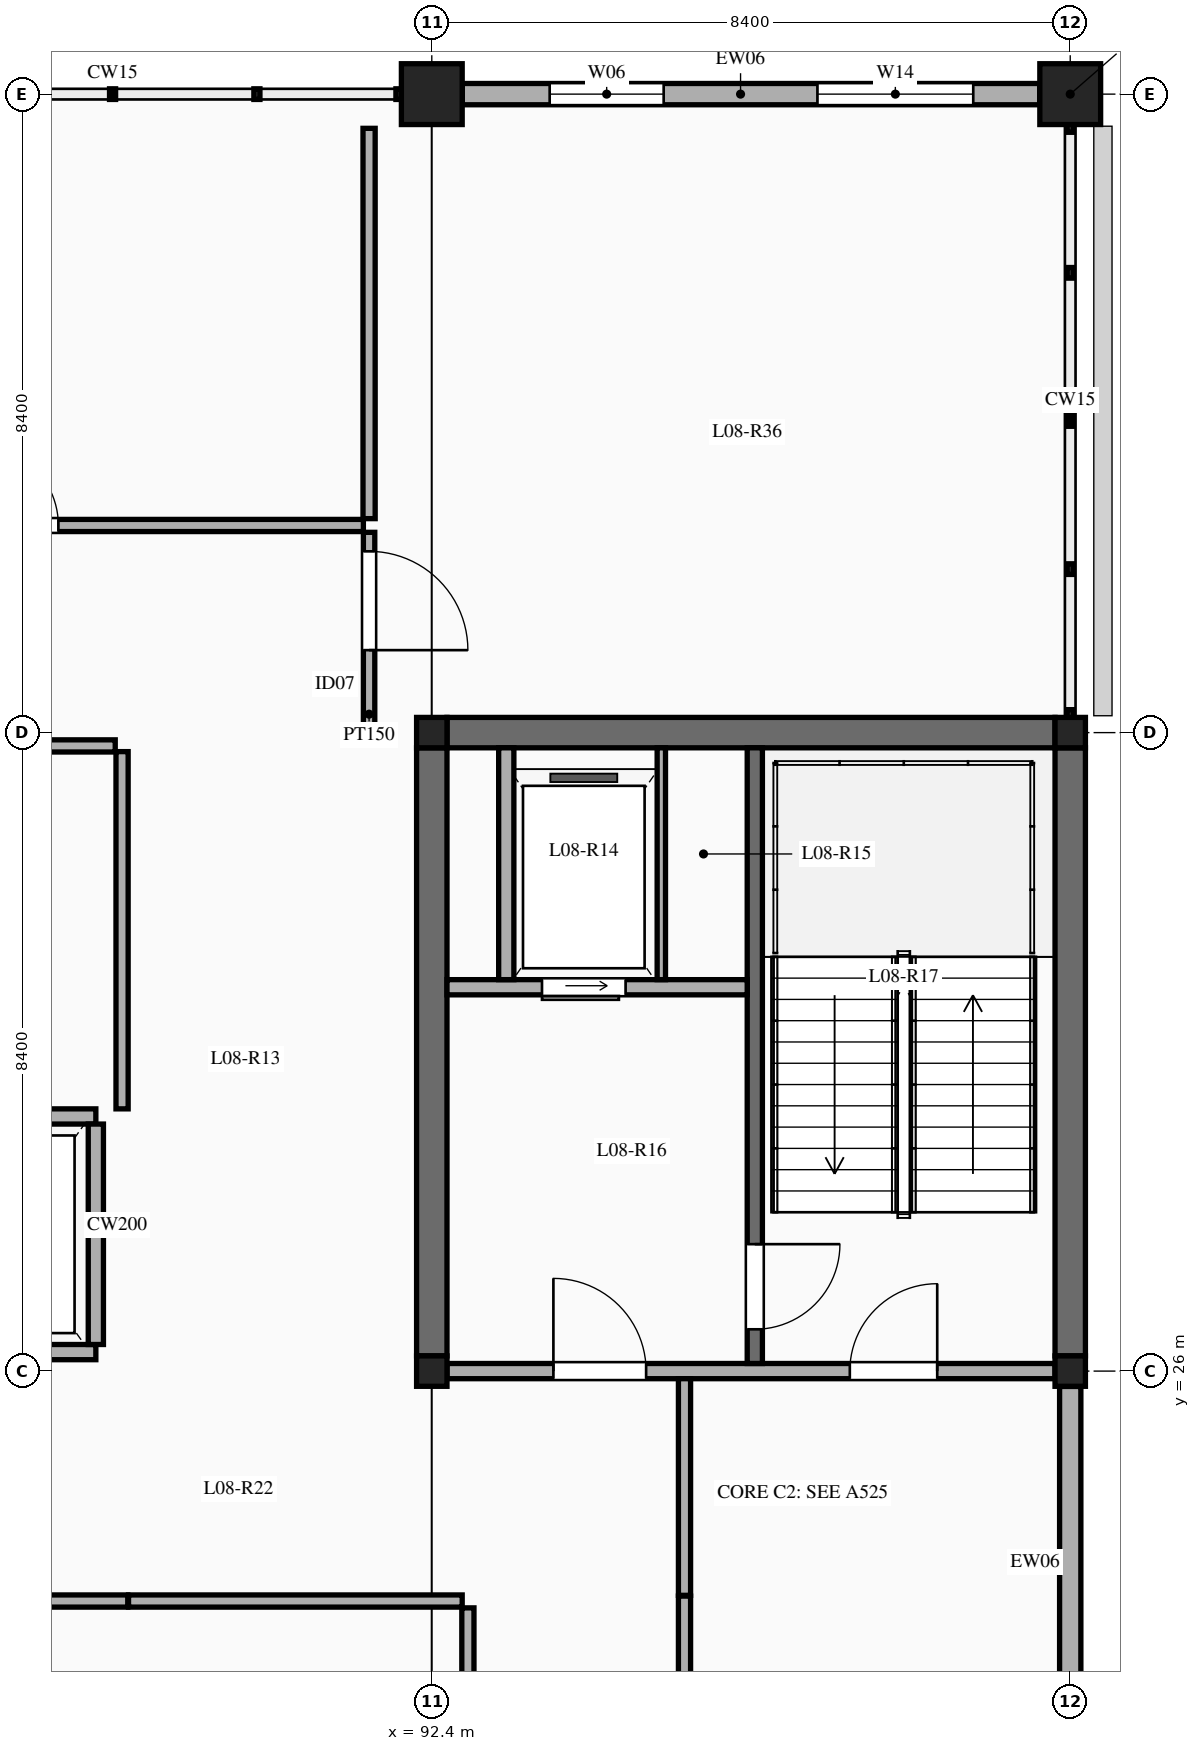
"""IFC4 building model, lengths in metres.
Left out: names, types, materials, properties, quantities, classifications, styles, units other than length and angle.
Written with IfcOpenShell. Run it as: python <this file> out.ifc"""

import sys

from ifc_helpers import new_model, si_unit, direction, frame, frame_2d, origin, origin_2d, place, context, subcontext, project, spatial, rectangle, extrude, element, fill, save


model = new_model("IFC4")
c1 = context("Model", 3, precision=1e-05, world=origin(), true_north=direction((0.0, 1.0)))
c2 = subcontext(c1, "Body", "Model", "MODEL_VIEW")
j1 = project(units=[si_unit("LENGTHUNIT", "METRE"), si_unit("PLANEANGLEUNIT", "RADIAN")], contexts=[c1])
p1 = place(None, origin())
s1 = spatial("IfcSite", under=j1, at=p1, CompositionType="ELEMENT")
p2 = place(p1, origin())
s2 = spatial("IfcBuilding", under=s1, at=p2, CompositionType="ELEMENT")
p3 = place(p2, frame((0.0, 0.0, 37.5)))
s3 = spatial("IfcBuildingStorey", under=s2, at=p3, CompositionType="ELEMENT", Elevation=37.5)
for number, where, z_axis, x_axis in (
    (1, (92.4, 26.0, 0.0), (0.0, 0.0, 1.0), (1.0, 0.0, 0.0)),
    (2, (92.4, 34.4, 0.0), (0.0, 0.0, 1.0), (1.0, 0.0, 0.0)),
):
    element("IfcColumn", number, at=place(p3, frame(where, z_axis=z_axis, x_axis=x_axis)), inside=s3, PredefinedType="COLUMN", context=c2, shape_type="SweptSolid", body=[
        extrude(rectangle(XDim=0.4, YDim=0.4, at=origin_2d()), origin(), (0.0, 0.0, 1.0), 4.5),
    ])
p4 = place(p3, frame((92.4, 42.8, 0.0), z_axis=(0.0, 0.0, 1.0), x_axis=(1.0, 0.0, 0.0)))
e3 = element("IfcColumn", 3, at=p4, inside=s3, PredefinedType="COLUMN", context=c2, shape_type="SweptSolid", body=[
    extrude(rectangle(XDim=0.8, YDim=0.8, at=origin_2d()), origin(), (0.0, 0.0, 1.0), 4.5),
])
for number, where, z_axis, x_axis in (
    (4, (100.8, 26.0, 0.0), (0.0, 0.0, 1.0), (1.0, 0.0, 0.0)),
    (5, (100.8, 34.4, 0.0), (0.0, 0.0, 1.0), (1.0, 0.0, 0.0)),
):
    element("IfcColumn", number, at=place(p3, frame(where, z_axis=z_axis, x_axis=x_axis)), inside=s3, PredefinedType="COLUMN", context=c2, shape_type="SweptSolid", body=[
        extrude(rectangle(XDim=0.4, YDim=0.4, at=origin_2d()), origin(), (0.0, 0.0, 1.0), 4.5),
    ])
p5 = place(p3, frame((100.8, 42.8, 0.0), z_axis=(0.0, 0.0, 1.0), x_axis=(1.0, 0.0, 0.0)))
e6 = element("IfcColumn", 6, at=p5, inside=s3, PredefinedType="COLUMN", context=c2, shape_type="SweptSolid", body=[
    extrude(rectangle(XDim=0.8, YDim=0.8, at=origin_2d()), origin(), (0.0, 0.0, 1.0), 4.5),
])
for number, where, z_axis, x_axis in (
    (7, (92.4, 26.2, 0.0), (0.0, 0.0, 1.0), (0.0, 1.0, 0.0)),
    (8, (100.8, 26.2, 0.0), (0.0, 0.0, 1.0), (0.0, 1.0, 0.0)),
    (9, (92.6, 34.4, 0.0), (0.0, 0.0, 1.0), (1.0, 0.0, 0.0)),
):
    element("IfcWall", number, at=place(p3, frame(where, z_axis=z_axis, x_axis=x_axis)), inside=s3, PredefinedType="SHEAR", context=c2, shape_type="SweptSolid", body=[
        extrude(rectangle(XDim=8.0, YDim=0.4, at=frame_2d((4.0, 0.0))), origin(), (0.0, 0.0, 1.0), 4.5),
    ])
p6 = place(p3, frame((92.802, 42.8, 0.0), z_axis=(0.0, 0.0, 1.0), x_axis=(1.0, 0.0, 0.0)))
e10 = element("IfcWall", 10, at=p6, inside=s3, PredefinedType="ELEMENTEDWALL", context=c2, shape_type="SweptSolid", body=[
    extrude(rectangle(XDim=7.596, YDim=0.28, at=frame_2d((3.798, 0.0))), origin(), (0.0, 0.0, 1.0), 3.55),
])
p7 = place(p6, frame((1.149, 0.0, 0.9)))
e11 = element("IfcOpeningElement", 11, at=p7, cuts=e10, PredefinedType="OPENING", context=c2, shape_type="SweptSolid", body=[
    extrude(rectangle(XDim=1.5, YDim=2.0, at=frame_2d((0.75, 1.0))), frame((0.0, 0.15, 0.0), z_axis=(0.0, -1.0, 0.0), x_axis=(1.0, 0.0, 0.0)), (0.0, 0.0, 1.0), 0.3),
])
p8 = place(p6, frame((4.672, 0.0, 0.9)))
e12 = element("IfcOpeningElement", 12, at=p8, cuts=e10, PredefinedType="OPENING", context=c2, shape_type="SweptSolid", body=[
    extrude(rectangle(XDim=2.05, YDim=2.1, at=frame_2d((1.025, 1.05))), frame((0.0, 0.15, 0.0), z_axis=(0.0, -1.0, 0.0), x_axis=(1.0, 0.0, 0.0)), (0.0, 0.0, 1.0), 0.3),
])
p9 = place(p3, frame((100.8, 18.002, 0.0), z_axis=(0.0, 0.0, 1.0), x_axis=(0.0, 1.0, 0.0)))
e13 = element("IfcWall", 13, at=p9, inside=s3, PredefinedType="ELEMENTEDWALL", context=c2, shape_type="SweptSolid", body=[
    extrude(rectangle(XDim=7.796, YDim=0.28, at=frame_2d((3.898, 0.0))), origin(), (0.0, 0.0, 1.0), 3.55),
])
p10 = place(p9, frame((1.024, 0.0, 0.9)))
e14 = element("IfcOpeningElement", 14, at=p10, cuts=e13, PredefinedType="OPENING", context=c2, shape_type="SweptSolid", body=[
    extrude(rectangle(XDim=1.85, YDim=2.05, at=frame_2d((0.925, 1.025))), frame((0.0, 0.15, 0.0), z_axis=(0.0, -1.0, 0.0), x_axis=(1.0, 0.0, 0.0)), (0.0, 0.0, 1.0), 0.3),
])
p11 = place(p3, frame((92.6, 26.0, 0.0), z_axis=(0.0, 0.0, 1.0), x_axis=(1.0, 0.0, 0.0)))
e15 = element("IfcWall", 15, at=p11, inside=s3, PredefinedType="SOLIDWALL", context=c2, shape_type="SweptSolid", body=[
    extrude(rectangle(XDim=8.0, YDim=0.2, at=frame_2d((4.0, 0.0))), origin(), (0.0, 0.0, 1.0), 3.78),
])
p12 = place(p11, frame((1.4, 0.0, 0.0)))
e16 = element("IfcOpeningElement", 16, at=p12, cuts=e15, PredefinedType="OPENING", context=c2, shape_type="SweptSolid", body=[
    extrude(rectangle(XDim=1.22, YDim=2.15, at=frame_2d((0.61, 1.075))), frame((0.0, 0.11, 0.0), z_axis=(0.0, -1.0, 0.0), x_axis=(1.0, 0.0, 0.0)), (0.0, 0.0, 1.0), 0.22),
])
p13 = place(p11, frame((5.3, 0.0, 0.0)))
e17 = element("IfcOpeningElement", 17, at=p13, cuts=e15, PredefinedType="OPENING", context=c2, shape_type="SweptSolid", body=[
    extrude(rectangle(XDim=1.15, YDim=2.15, at=frame_2d((0.575, 1.075))), frame((0.0, 0.11, 0.0), z_axis=(0.0, -1.0, 0.0), x_axis=(1.0, 0.0, 0.0)), (0.0, 0.0, 1.0), 0.22),
])
p14 = place(p3, frame((96.65, 26.1, 0.0), z_axis=(0.0, 0.0, 1.0), x_axis=(0.0, 1.0, 0.0)))
e18 = element("IfcWall", 18, at=p14, inside=s3, PredefinedType="SOLIDWALL", context=c2, shape_type="SweptSolid", body=[
    extrude(rectangle(XDim=8.1, YDim=0.2, at=frame_2d((4.05, 0.0))), origin(), (0.0, 0.0, 1.0), 4.3),
])
p15 = place(p14, frame((0.45, 0.0, 0.0)))
e19 = element("IfcOpeningElement", 19, at=p15, cuts=e18, PredefinedType="OPENING", context=c2, shape_type="SweptSolid", body=[
    extrude(rectangle(XDim=1.12, YDim=2.15, at=frame_2d((0.56, 1.075))), frame((0.0, 0.11, 0.0), z_axis=(0.0, -1.0, 0.0), x_axis=(1.0, 0.0, 0.0)), (0.0, 0.0, 1.0), 0.22),
])
p16 = place(p3, frame((92.6, 31.05, 0.0), z_axis=(0.0, 0.0, 1.0), x_axis=(1.0, 0.0, 0.0)))
e20 = element("IfcWall", 20, at=p16, inside=s3, PredefinedType="SOLIDWALL", context=c2, shape_type="SweptSolid", body=[
    extrude(rectangle(XDim=3.95, YDim=0.2, at=frame_2d((1.975, 0.0))), origin(), (0.0, 0.0, 1.0), 4.3),
])
p17 = place(p16, frame((1.25, 0.0, 0.0)))
e21 = element("IfcOpeningElement", 21, at=p17, cuts=e20, PredefinedType="OPENING", context=c2, shape_type="SweptSolid", body=[
    extrude(rectangle(XDim=1.1, YDim=2.15, at=frame_2d((0.55, 1.075))), frame((0.0, 0.11, 0.0), z_axis=(0.0, -1.0, 0.0), x_axis=(1.0, 0.0, 0.0)), (0.0, 0.0, 1.0), 0.22),
])
p18 = place(p3, frame((95.42, 31.15, 0.0), z_axis=(0.0, 0.0, 1.0), x_axis=(0.0, 1.0, 0.0)))
e22 = element("IfcWall", 22, at=p18, inside=s3, PredefinedType="PARTITIONING", context=c2, shape_type="SweptSolid", body=[
    extrude(rectangle(XDim=3.05, YDim=0.11, at=frame_2d((1.525, 0.0))), origin(), (0.0, 0.0, 1.0), 4.3),
])
p19 = place(p3, frame((93.38, 31.15, 0.0), z_axis=(0.0, 0.0, 1.0), x_axis=(0.0, 1.0, 0.0)))
e23 = element("IfcWall", 23, at=p19, inside=s3, PredefinedType="SOLIDWALL", context=c2, shape_type="SweptSolid", body=[
    extrude(rectangle(XDim=3.05, YDim=0.2, at=frame_2d((1.525, 0.0))), origin(), (0.0, 0.0, 1.0), 4.3),
])
p20 = place(p3, frame((85.62, 26.25, 0.0), z_axis=(0.0, 0.0, 1.0), x_axis=(1.0, 0.0, 0.0)))
e24 = element("IfcWall", 24, at=p20, inside=s3, PredefinedType="SOLIDWALL", context=c2, shape_type="SweptSolid", body=[
    extrude(rectangle(XDim=2.36, YDim=0.2, at=frame_2d((1.18, 0.0))), origin(), (0.0, 0.0, 1.0), 3.78),
])
p21 = place(p20, frame((0.605, 0.0, 0.0)))
e25 = element("IfcOpeningElement", 25, at=p21, cuts=e24, PredefinedType="OPENING", context=c2, shape_type="SweptSolid", body=[
    extrude(rectangle(XDim=1.15, YDim=2.2, at=frame_2d((0.575, 1.1))), frame((0.0, 0.11, 0.0), z_axis=(0.0, -1.0, 0.0), x_axis=(1.0, 0.0, 0.0)), (0.0, 0.0, 1.0), 0.22),
])
p22 = place(p3, frame((85.62, 29.35, 0.0), z_axis=(0.0, 0.0, 1.0), x_axis=(1.0, 0.0, 0.0)))
e26 = element("IfcWall", 26, at=p22, inside=s3, PredefinedType="SOLIDWALL", context=c2, shape_type="SweptSolid", body=[
    extrude(rectangle(XDim=2.36, YDim=0.2, at=frame_2d((1.18, 0.0))), origin(), (0.0, 0.0, 1.0), 4.3),
])
p23 = place(p3, frame((87.98, 26.35, 0.0), z_axis=(0.0, 0.0, 1.0), x_axis=(0.0, 1.0, 0.0)))
e27 = element("IfcWall", 27, at=p23, inside=s3, PredefinedType="SOLIDWALL", context=c2, shape_type="SweptSolid", body=[
    extrude(rectangle(XDim=2.9, YDim=0.2, at=frame_2d((1.45, 0.0))), origin(), (0.0, 0.0, 1.0), 3.98),
])
p24 = place(p3, frame((88.325, 29.45, 0.0), z_axis=(0.0, 0.0, 1.0), x_axis=(0.0, 1.0, 0.0)))
e28 = element("IfcWall", 28, at=p24, inside=s3, PredefinedType="PARTITIONING", context=c2, shape_type="SweptSolid", body=[
    extrude(rectangle(XDim=4.7, YDim=0.16, at=frame_2d((2.35, 0.0))), origin(), (0.0, 0.0, 1.0), 3.45),
])
p25 = place(p3, frame((84.43, 34.225, 0.0), z_axis=(0.0, 0.0, 1.0), x_axis=(1.0, 0.0, 0.0)))
e29 = element("IfcWall", 29, at=p25, inside=s3, PredefinedType="PARTITIONING", context=c2, shape_type="SweptSolid", body=[
    extrude(rectangle(XDim=3.805, YDim=0.16, at=frame_2d((1.903, 0.0))), origin(), (0.0, 0.0, 1.0), 3.45),
])
p26 = place(p3, frame((84.51, 22.975, 0.0), z_axis=(0.0, 0.0, 1.0), x_axis=(1.0, 0.0, 0.0)))
e30 = element("IfcWall", 30, at=p26, inside=s3, PredefinedType="PARTITIONING", context=c2, shape_type="SweptSolid", body=[
    extrude(rectangle(XDim=3.89, YDim=0.16, at=frame_2d((1.945, 0.0))), origin(), (0.0, 0.0, 1.0), 3.45),
])
p27 = place(p3, frame((88.41, 22.975, 0.0), z_axis=(0.0, 0.0, 1.0), x_axis=(1.0, 0.0, 0.0)))
e31 = element("IfcWall", 31, at=p27, inside=s3, PredefinedType="PARTITIONING", context=c2, shape_type="SweptSolid", body=[
    extrude(rectangle(XDim=4.39, YDim=0.16, at=frame_2d((2.195, 0.0))), origin(), (0.0, 0.0, 1.0), 3.45),
])
p28 = place(p3, frame((95.725, 23.05, 0.0), z_axis=(0.0, 0.0, 1.0), x_axis=(0.0, 1.0, 0.0)))
e32 = element("IfcWall", 32, at=p28, inside=s3, PredefinedType="PARTITIONING", context=c2, shape_type="SweptSolid", body=[
    extrude(rectangle(XDim=2.85, YDim=0.16, at=frame_2d((1.425, 0.0))), origin(), (0.0, 0.0, 1.0), 3.45),
])
p29 = place(p3, frame((92.875, 18.03, 0.0), z_axis=(0.0, 0.0, 1.0), x_axis=(0.0, 1.0, 0.0)))
e33 = element("IfcWall", 33, at=p29, inside=s3, PredefinedType="PARTITIONING", context=c2, shape_type="SweptSolid", body=[
    extrude(rectangle(XDim=4.855, YDim=0.16, at=frame_2d((2.427, 0.0))), origin(), (0.0, 0.0, 1.0), 3.45),
])
p30 = place(p3, frame((95.725, 14.8, 0.0), z_axis=(0.0, 0.0, 1.0), x_axis=(0.0, 1.0, 0.0)))
e34 = element("IfcWall", 34, at=p30, inside=s3, PredefinedType="PARTITIONING", context=c2, shape_type="SweptSolid", body=[
    extrude(rectangle(XDim=8.24, YDim=0.16, at=frame_2d((4.12, 0.0))), origin(), (0.0, 0.0, 1.0), 3.45),
])
p31 = place(p30, frame((3.989, 0.0, 0.0)))
e35 = element("IfcOpeningElement", 35, at=p31, cuts=e34, PredefinedType="OPENING", context=c2, shape_type="SweptSolid", body=[
    extrude(rectangle(XDim=1.16, YDim=2.2, at=frame_2d((0.58, 1.1))), frame((0.0, 0.09, 0.0), z_axis=(0.0, -1.0, 0.0), x_axis=(1.0, 0.0, 0.0)), (0.0, 0.0, 1.0), 0.18),
])
p32 = place(p3, frame((78.35, 37.125, 0.0), z_axis=(0.0, 0.0, 1.0), x_axis=(1.0, 0.0, 0.0)))
e36 = element("IfcWall", 36, at=p32, inside=s3, PredefinedType="PARTITIONING", context=c2, shape_type="SweptSolid", body=[
    extrude(rectangle(XDim=13.15, YDim=0.16, at=frame_2d((6.575, 0.0))), origin(), (0.0, 0.0, 1.0), 3.45),
])
p33 = place(p32, frame((8.077, 0.0, 0.0)))
e37 = element("IfcOpeningElement", 37, at=p33, cuts=e36, PredefinedType="OPENING", context=c2, shape_type="SweptSolid", body=[
    extrude(rectangle(XDim=1.06, YDim=2.18, at=frame_2d((0.53, 1.09))), frame((0.0, 0.09, 0.0), z_axis=(0.0, -1.0, 0.0), x_axis=(1.0, 0.0, 0.0)), (0.0, 0.0, 1.0), 0.18),
])
p34 = place(p3, frame((91.575, 34.3, 0.0), z_axis=(0.0, 0.0, 1.0), x_axis=(0.0, 1.0, 0.0)))
e38 = element("IfcWall", 38, at=p34, inside=s3, PredefinedType="PARTITIONING", context=c2, shape_type="SweptSolid", body=[
    extrude(rectangle(XDim=2.735, YDim=0.15, at=frame_2d((1.367, 0.0))), origin(), (0.0, 0.0, 1.0), 3.45),
])
p35 = place(p34, frame((1.185, 0.0, 0.0)))
e39 = element("IfcOpeningElement", 39, at=p35, cuts=e38, PredefinedType="OPENING", context=c2, shape_type="SweptSolid", body=[
    extrude(rectangle(XDim=1.3, YDim=2.25, at=frame_2d((0.65, 1.125))), frame((0.0, 0.085, 0.0), z_axis=(0.0, -1.0, 0.0), x_axis=(1.0, 0.0, 0.0)), (0.0, 0.0, 1.0), 0.17),
])
p36 = place(p3, frame((91.575, 37.215, 0.0), z_axis=(0.0, 0.0, 1.0), x_axis=(0.0, 1.0, 0.0)))
e40 = element("IfcWall", 40, at=p36, inside=s3, PredefinedType="PARTITIONING", context=c2, shape_type="SweptSolid", body=[
    extrude(rectangle(XDim=5.135, YDim=0.16, at=frame_2d((2.567, 0.0))), origin(), (0.0, 0.0, 1.0), 3.45),
])
p37 = place(p7, origin())
e41 = element("IfcWindow", 41, at=p37, inside=s3, PartitioningType="DOUBLE_PANEL_VERTICAL", PredefinedType="WINDOW", context=c2, shape_type="SweptSolid", body=[
    extrude(rectangle(XDim=1.5, YDim=2.0, at=frame_2d((0.75, 1.0))), frame((0.0, 0.03, 0.0), z_axis=(0.0, -1.0, 0.0), x_axis=(1.0, 0.0, 0.0)), (0.0, 0.0, 1.0), 0.06),
])
fill(e11, e41)
p38 = place(p8, origin())
e42 = element("IfcWindow", 42, at=p38, inside=s3, PartitioningType="TRIPLE_PANEL_VERTICAL", PredefinedType="WINDOW", context=c2, shape_type="SweptSolid", body=[
    extrude(rectangle(XDim=2.05, YDim=2.1, at=frame_2d((1.025, 1.05))), frame((0.0, 0.03, 0.0), z_axis=(0.0, -1.0, 0.0), x_axis=(1.0, 0.0, 0.0)), (0.0, 0.0, 1.0), 0.06),
])
fill(e12, e42)
p39 = place(p12, origin())
e43 = element("IfcDoor", 43, at=p39, inside=s3, OperationType="SINGLE_SWING_LEFT", PredefinedType="DOOR", context=c2, shape_type="SweptSolid", body=[
    extrude(rectangle(XDim=1.22, YDim=2.15, at=frame_2d((0.61, 1.075))), frame((0.0, 0.025, 0.0), z_axis=(0.0, -1.0, 0.0), x_axis=(1.0, 0.0, 0.0)), (0.0, 0.0, 1.0), 0.05),
])
fill(e16, e43)
p40 = place(p13, origin())
e44 = element("IfcDoor", 44, at=p40, inside=s3, OperationType="SINGLE_SWING_RIGHT", PredefinedType="DOOR", context=c2, shape_type="SweptSolid", body=[
    extrude(rectangle(XDim=1.15, YDim=2.15, at=frame_2d((0.575, 1.075))), frame((0.0, 0.025, 0.0), z_axis=(0.0, -1.0, 0.0), x_axis=(1.0, 0.0, 0.0)), (0.0, 0.0, 1.0), 0.05),
])
fill(e17, e44)
p41 = place(p15, frame((1.12, 0.0, 0.0), z_axis=(0.0, 0.0, 1.0), x_axis=(-1.0, 0.0, 0.0)))
e45 = element("IfcDoor", 45, at=p41, inside=s3, OperationType="SINGLE_SWING_LEFT", PredefinedType="DOOR", context=c2, shape_type="SweptSolid", body=[
    extrude(rectangle(XDim=1.12, YDim=2.15, at=frame_2d((0.56, 1.075))), frame((0.0, 0.025, 0.0), z_axis=(0.0, -1.0, 0.0), x_axis=(1.0, 0.0, 0.0)), (0.0, 0.0, 1.0), 0.05),
])
fill(e19, e45)
p42 = place(p17, frame((1.1, 0.0, 0.0), z_axis=(0.0, 0.0, 1.0), x_axis=(-1.0, 0.0, 0.0)))
e46 = element("IfcDoor", 46, at=p42, inside=s3, OperationType="SLIDING_TO_LEFT", PredefinedType="DOOR", context=c2, shape_type="SweptSolid", body=[
    extrude(rectangle(XDim=1.1, YDim=2.15, at=frame_2d((0.55, 1.075))), frame((0.0, 0.025, 0.0), z_axis=(0.0, -1.0, 0.0), x_axis=(1.0, 0.0, 0.0)), (0.0, 0.0, 1.0), 0.05),
])
fill(e21, e46)
p43 = place(p33, origin())
e47 = element("IfcDoor", 47, at=p43, inside=s3, OperationType="SINGLE_SWING_LEFT", PredefinedType="DOOR", context=c2, shape_type="SweptSolid", body=[
    extrude(rectangle(XDim=1.06, YDim=2.18, at=frame_2d((0.53, 1.09))), frame((0.0, 0.025, 0.0), z_axis=(0.0, -1.0, 0.0), x_axis=(1.0, 0.0, 0.0)), (0.0, 0.0, 1.0), 0.05),
])
fill(e37, e47)
p44 = place(p35, frame((1.3, 0.0, 0.0), z_axis=(0.0, 0.0, 1.0), x_axis=(-1.0, 0.0, 0.0)))
e48 = element("IfcDoor", 48, at=p44, inside=s3, OperationType="SINGLE_SWING_RIGHT", PredefinedType="DOOR", context=c2, shape_type="SweptSolid", body=[
    extrude(rectangle(XDim=1.3, YDim=2.25, at=frame_2d((0.65, 1.125))), frame((0.0, 0.025, 0.0), z_axis=(0.0, -1.0, 0.0), x_axis=(1.0, 0.0, 0.0)), (0.0, 0.0, 1.0), 0.05),
])
fill(e39, e48)
save(model, sys.argv[1])
